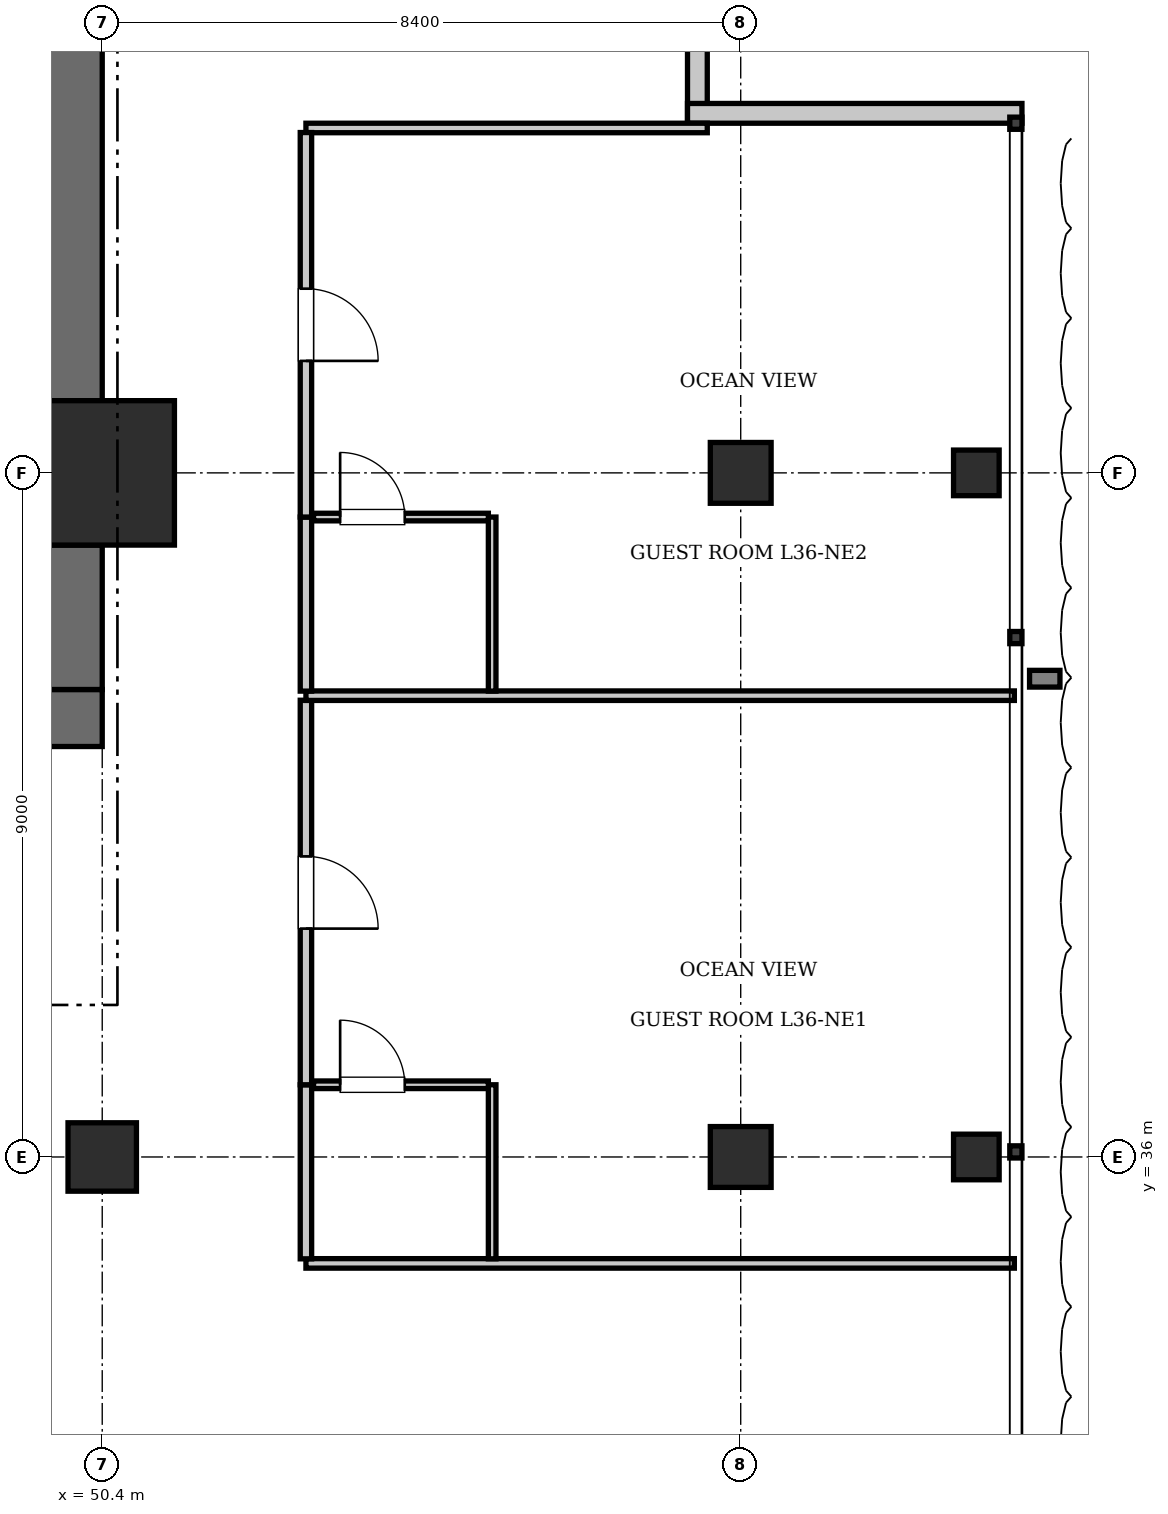
"""IFC4 building model, lengths in metres.
Left out: names, types, materials, properties, quantities, classifications, styles, units other than length and angle.
Written with IfcOpenShell. Run it as: python <this file> out.ifc"""

import sys

from ifc_helpers import new_model, si_unit, direction, frame, frame_2d, origin, origin_2d, place, context, subcontext, project, spatial, rectangle, i_section, extrude, element, fill, save


model = new_model("IFC4")
c1 = context("Model", 3, precision=1e-05, world=origin(), true_north=direction((0.0, 1.0)))
c2 = subcontext(c1, "Body", "Model", "MODEL_VIEW")
j1 = project(units=[si_unit("LENGTHUNIT", "METRE"), si_unit("PLANEANGLEUNIT", "RADIAN")], contexts=[c1])
p1 = place(None, origin())
s1 = spatial("IfcSite", under=j1, at=p1, CompositionType="ELEMENT")
p2 = place(p1, origin())
s2 = spatial("IfcBuilding", under=s1, at=p2, CompositionType="ELEMENT")
p3 = place(p2, frame((0.0, 0.0, 150.5)))
s3 = spatial("IfcBuildingStorey", under=s2, at=p3, CompositionType="ELEMENT", Elevation=150.5)
p4 = place(p3, frame((50.4, 45.0, 0.0), z_axis=(0.0, 0.0, 1.0), x_axis=(1.0, 0.0, 0.0)))
e1 = element("IfcColumn", 1, at=p4, inside=s3, PredefinedType="COLUMN", context=c2, shape_type="SweptSolid", body=[
    extrude(rectangle(XDim=1.9, YDim=1.9, at=origin_2d()), origin(), (0.0, 0.0, 1.0), 3.85),
])
p5 = place(p3, frame((43.6, 41.775, 0.0), z_axis=(0.0, 0.0, 1.0), x_axis=(1.0, 0.0, 0.0)))
e2 = element("IfcWall", 2, at=p5, inside=s3, PredefinedType="SHEAR", context=c2, shape_type="SweptSolid", body=[
    extrude(rectangle(XDim=6.8, YDim=0.75, at=frame_2d((3.4, 0.0))), origin(), (0.0, 0.0, 1.0), 3.85),
])
p6 = place(p5, frame((3.9, 0.0, 0.0)))
e3 = element("IfcOpeningElement", 3, at=p6, cuts=e2, PredefinedType="OPENING", context=c2, shape_type="SweptSolid", body=[
    extrude(rectangle(XDim=1.15, YDim=2.15, at=frame_2d((0.575, 1.075))), frame((0.0, 0.385, 0.0), z_axis=(0.0, -1.0, 0.0), x_axis=(1.0, 0.0, 0.0)), (0.0, 0.0, 1.0), 0.77),
])
p7 = place(p5, frame((0.55, 0.0, 0.0)))
e4 = element("IfcOpeningElement", 4, at=p7, cuts=e2, PredefinedType="OPENING", context=c2, shape_type="SweptSolid", body=[
    extrude(rectangle(XDim=1.1, YDim=2.2, at=frame_2d((0.55, 1.1))), frame((0.0, 0.385, 0.0), z_axis=(0.0, -1.0, 0.0), x_axis=(1.0, 0.0, 0.0)), (0.0, 0.0, 1.0), 0.77),
])
p8 = place(p3, frame((50.025, 42.15, 0.0), z_axis=(0.0, 0.0, 1.0), x_axis=(0.0, 1.0, 0.0)))
e5 = element("IfcWall", 5, at=p8, inside=s3, PredefinedType="SHEAR", context=c2, shape_type="SweptSolid", body=[
    extrude(rectangle(XDim=1.9, YDim=0.75, at=frame_2d((0.95, 0.0))), origin(), (0.0, 0.0, 1.0), 3.85),
])
p9 = place(p3, frame((50.025, 45.95, 0.0), z_axis=(0.0, 0.0, 1.0), x_axis=(0.0, 1.0, 0.0)))
e6 = element("IfcWall", 6, at=p9, inside=s3, PredefinedType="SHEAR", context=c2, shape_type="SweptSolid", body=[
    extrude(rectangle(XDim=7.3, YDim=0.75, at=frame_2d((3.65, 0.0))), origin(), (0.0, 0.0, 1.0), 3.85),
])
p10 = place(p3, frame((50.4, 36.0, 0.0), z_axis=(0.0, 0.0, 1.0), x_axis=(1.0, 0.0, 0.0)))
e7 = element("IfcColumn", 7, at=p10, inside=s3, PredefinedType="COLUMN", context=c2, shape_type="SweptSolid", body=[
    extrude(rectangle(XDim=0.9, YDim=0.9, at=origin_2d()), origin(), (0.0, 0.0, 1.0), 3.85),
])
for number, where, z_axis, x_axis in (
    (8, (58.8, 36.0, 0.0), (0.0, 0.0, 1.0), (1.0, 0.0, 0.0)),
    (9, (58.8, 45.0, 0.0), (0.0, 0.0, 1.0), (1.0, 0.0, 0.0)),
):
    element("IfcColumn", number, at=place(p3, frame(where, z_axis=z_axis, x_axis=x_axis)), inside=s3, PredefinedType="COLUMN", context=c2, shape_type="SweptSolid", body=[
        extrude(rectangle(XDim=0.8, YDim=0.8, at=origin_2d()), origin(), (0.0, 0.0, 1.0), 3.85),
    ])
for number, where, z_axis, x_axis in (
    (10, (61.9, 36.0, 0.0), (0.0, 0.0, 1.0), (1.0, 0.0, 0.0)),
    (11, (61.9, 45.0, 0.0), (0.0, 0.0, 1.0), (1.0, 0.0, 0.0)),
):
    element("IfcColumn", number, at=place(p3, frame(where, z_axis=z_axis, x_axis=x_axis)), inside=s3, PredefinedType="COLUMN", context=c2, shape_type="SweptSolid", body=[
        extrude(i_section(OverallWidth=0.6, OverallDepth=0.6, WebThickness=0.025, FlangeThickness=0.038, at=origin_2d()), origin(), (0.0, 0.0, 1.0), 3.85),
    ])
for number, where, z_axis, x_axis in (
    (12, (58.23, 54.0, 0.0), (0.0, 0.0, 1.0), (0.0, -1.0, 0.0)),
    (13, (58.1, 49.73, 0.0), (0.0, 0.0, 1.0), (1.0, 0.0, 0.0)),
):
    element("IfcWall", number, at=place(p3, frame(where, z_axis=z_axis, x_axis=x_axis)), inside=s3, PredefinedType="SOLIDWALL", context=c2, shape_type="SweptSolid", body=[
        extrude(rectangle(XDim=4.4, YDim=0.26, at=frame_2d((2.2, 0.0))), origin(), (0.0, 0.0, 1.0), 3.61),
    ])
p11 = place(p3, frame((53.08, 34.6, 0.0), z_axis=(0.0, 0.0, 1.0), x_axis=(1.0, 0.0, 0.0)))
e14 = element("IfcWall", 14, at=p11, inside=s3, PredefinedType="PARTITIONING", context=c2, shape_type="SweptSolid", body=[
    extrude(rectangle(XDim=9.32, YDim=0.125, at=frame_2d((4.66, 0.0))), origin(), (0.0, 0.0, 1.0), 3.61),
])
p12 = place(p3, frame((53.08, 49.538, 0.0), z_axis=(0.0, 0.0, 1.0), x_axis=(1.0, 0.0, 0.0)))
e15 = element("IfcWall", 15, at=p12, inside=s3, PredefinedType="PARTITIONING", context=c2, shape_type="SweptSolid", body=[
    extrude(rectangle(XDim=5.28, YDim=0.125, at=frame_2d((2.64, 0.0))), origin(), (0.0, 0.0, 1.0), 3.61),
])
p13 = place(p3, frame((53.08, 34.66, 0.0), z_axis=(0.0, 0.0, 1.0), x_axis=(0.0, 1.0, 0.0)))
e16 = element("IfcWall", 16, at=p13, inside=s3, PredefinedType="PARTITIONING", context=c2, shape_type="SweptSolid", body=[
    extrude(rectangle(XDim=2.29, YDim=0.15, at=frame_2d((1.145, 0.0))), origin(), (0.0, 0.0, 1.0), 3.61),
])
p14 = place(p3, frame((53.08, 36.95, 0.0), z_axis=(0.0, 0.0, 1.0), x_axis=(0.0, 1.0, 0.0)))
e17 = element("IfcWall", 17, at=p14, inside=s3, PredefinedType="PARTITIONING", context=c2, shape_type="SweptSolid", body=[
    extrude(rectangle(XDim=5.059, YDim=0.15, at=frame_2d((2.529, 0.0))), origin(), (0.0, 0.0, 1.0), 3.61),
])
p15 = place(p14, frame((2.054, 0.0, 0.0)))
e18 = element("IfcOpeningElement", 18, at=p15, cuts=e17, PredefinedType="OPENING", context=c2, shape_type="SweptSolid", body=[
    extrude(rectangle(XDim=0.95, YDim=2.15, at=frame_2d((0.475, 1.075))), frame((0.0, 0.085, 0.0), z_axis=(0.0, -1.0, 0.0), x_axis=(1.0, 0.0, 0.0)), (0.0, 0.0, 1.0), 0.17),
])
p16 = place(p3, frame((55.53, 34.66, 0.0), z_axis=(0.0, 0.0, 1.0), x_axis=(0.0, 1.0, 0.0)))
e19 = element("IfcWall", 19, at=p16, inside=s3, PredefinedType="PARTITIONING", context=c2, shape_type="SweptSolid", body=[
    extrude(rectangle(XDim=2.29, YDim=0.1, at=frame_2d((1.145, 0.0))), origin(), (0.0, 0.0, 1.0), 3.61),
])
p17 = place(p3, frame((53.18, 36.95, 0.0), z_axis=(0.0, 0.0, 1.0), x_axis=(1.0, 0.0, 0.0)))
e20 = element("IfcWall", 20, at=p17, inside=s3, PredefinedType="PARTITIONING", context=c2, shape_type="SweptSolid", body=[
    extrude(rectangle(XDim=2.3, YDim=0.1, at=frame_2d((1.15, 0.0))), origin(), (0.0, 0.0, 1.0), 3.61),
])
p18 = place(p17, frame((0.35, 0.0, 0.0)))
e21 = element("IfcOpeningElement", 21, at=p18, cuts=e20, PredefinedType="OPENING", context=c2, shape_type="SweptSolid", body=[
    extrude(rectangle(XDim=0.85, YDim=2.1, at=frame_2d((0.425, 1.05))), frame((0.0, 0.06, 0.0), z_axis=(0.0, -1.0, 0.0), x_axis=(1.0, 0.0, 0.0)), (0.0, 0.0, 1.0), 0.12),
])
p19 = place(p3, frame((53.08, 42.069, 0.0), z_axis=(0.0, 0.0, 1.0), x_axis=(1.0, 0.0, 0.0)))
e22 = element("IfcWall", 22, at=p19, inside=s3, PredefinedType="PARTITIONING", context=c2, shape_type="SweptSolid", body=[
    extrude(rectangle(XDim=9.32, YDim=0.125, at=frame_2d((4.66, 0.0))), origin(), (0.0, 0.0, 1.0), 3.61),
])
p20 = place(p3, frame((53.08, 42.129, 0.0), z_axis=(0.0, 0.0, 1.0), x_axis=(0.0, 1.0, 0.0)))
e23 = element("IfcWall", 23, at=p20, inside=s3, PredefinedType="PARTITIONING", context=c2, shape_type="SweptSolid", body=[
    extrude(rectangle(XDim=2.29, YDim=0.15, at=frame_2d((1.145, 0.0))), origin(), (0.0, 0.0, 1.0), 3.61),
])
p21 = place(p3, frame((53.08, 44.419, 0.0), z_axis=(0.0, 0.0, 1.0), x_axis=(0.0, 1.0, 0.0)))
e24 = element("IfcWall", 24, at=p21, inside=s3, PredefinedType="PARTITIONING", context=c2, shape_type="SweptSolid", body=[
    extrude(rectangle(XDim=5.059, YDim=0.15, at=frame_2d((2.529, 0.0))), origin(), (0.0, 0.0, 1.0), 3.61),
])
p22 = place(p21, frame((2.054, 0.0, 0.0)))
e25 = element("IfcOpeningElement", 25, at=p22, cuts=e24, PredefinedType="OPENING", context=c2, shape_type="SweptSolid", body=[
    extrude(rectangle(XDim=0.95, YDim=2.15, at=frame_2d((0.475, 1.075))), frame((0.0, 0.085, 0.0), z_axis=(0.0, -1.0, 0.0), x_axis=(1.0, 0.0, 0.0)), (0.0, 0.0, 1.0), 0.17),
])
p23 = place(p3, frame((55.53, 42.129, 0.0), z_axis=(0.0, 0.0, 1.0), x_axis=(0.0, 1.0, 0.0)))
e26 = element("IfcWall", 26, at=p23, inside=s3, PredefinedType="PARTITIONING", context=c2, shape_type="SweptSolid", body=[
    extrude(rectangle(XDim=2.29, YDim=0.1, at=frame_2d((1.145, 0.0))), origin(), (0.0, 0.0, 1.0), 3.61),
])
p24 = place(p3, frame((53.18, 44.419, 0.0), z_axis=(0.0, 0.0, 1.0), x_axis=(1.0, 0.0, 0.0)))
e27 = element("IfcWall", 27, at=p24, inside=s3, PredefinedType="PARTITIONING", context=c2, shape_type="SweptSolid", body=[
    extrude(rectangle(XDim=2.3, YDim=0.1, at=frame_2d((1.15, 0.0))), origin(), (0.0, 0.0, 1.0), 3.61),
])
p25 = place(p24, frame((0.35, 0.0, 0.0)))
e28 = element("IfcOpeningElement", 28, at=p25, cuts=e27, PredefinedType="OPENING", context=c2, shape_type="SweptSolid", body=[
    extrude(rectangle(XDim=0.85, YDim=2.1, at=frame_2d((0.425, 1.05))), frame((0.0, 0.06, 0.0), z_axis=(0.0, -1.0, 0.0), x_axis=(1.0, 0.0, 0.0)), (0.0, 0.0, 1.0), 0.12),
])
p26 = place(p18, origin())
e29 = element("IfcDoor", 29, at=p26, inside=s3, OperationType="SINGLE_SWING_LEFT", PredefinedType="DOOR", context=c2, shape_type="SweptSolid", body=[
    extrude(rectangle(XDim=0.85, YDim=2.1, at=frame_2d((0.425, 1.05))), frame((0.0, 0.025, 0.0), z_axis=(0.0, -1.0, 0.0), x_axis=(1.0, 0.0, 0.0)), (0.0, 0.0, 1.0), 0.05),
])
fill(e21, e29)
p27 = place(p15, frame((0.95, 0.0, 0.0), z_axis=(0.0, 0.0, 1.0), x_axis=(-1.0, 0.0, 0.0)))
e30 = element("IfcDoor", 30, at=p27, inside=s3, OperationType="SINGLE_SWING_RIGHT", PredefinedType="DOOR", context=c2, shape_type="SweptSolid", body=[
    extrude(rectangle(XDim=0.95, YDim=2.15, at=frame_2d((0.475, 1.075))), frame((0.0, 0.025, 0.0), z_axis=(0.0, -1.0, 0.0), x_axis=(1.0, 0.0, 0.0)), (0.0, 0.0, 1.0), 0.05),
])
fill(e18, e30)
p28 = place(p25, origin())
e31 = element("IfcDoor", 31, at=p28, inside=s3, OperationType="SINGLE_SWING_LEFT", PredefinedType="DOOR", context=c2, shape_type="SweptSolid", body=[
    extrude(rectangle(XDim=0.85, YDim=2.1, at=frame_2d((0.425, 1.05))), frame((0.0, 0.025, 0.0), z_axis=(0.0, -1.0, 0.0), x_axis=(1.0, 0.0, 0.0)), (0.0, 0.0, 1.0), 0.05),
])
fill(e28, e31)
p29 = place(p22, frame((0.95, 0.0, 0.0), z_axis=(0.0, 0.0, 1.0), x_axis=(-1.0, 0.0, 0.0)))
e32 = element("IfcDoor", 32, at=p29, inside=s3, OperationType="SINGLE_SWING_RIGHT", PredefinedType="DOOR", context=c2, shape_type="SweptSolid", body=[
    extrude(rectangle(XDim=0.95, YDim=2.15, at=frame_2d((0.475, 1.075))), frame((0.0, 0.025, 0.0), z_axis=(0.0, -1.0, 0.0), x_axis=(1.0, 0.0, 0.0)), (0.0, 0.0, 1.0), 0.05),
])
fill(e25, e32)
save(model, sys.argv[1])
